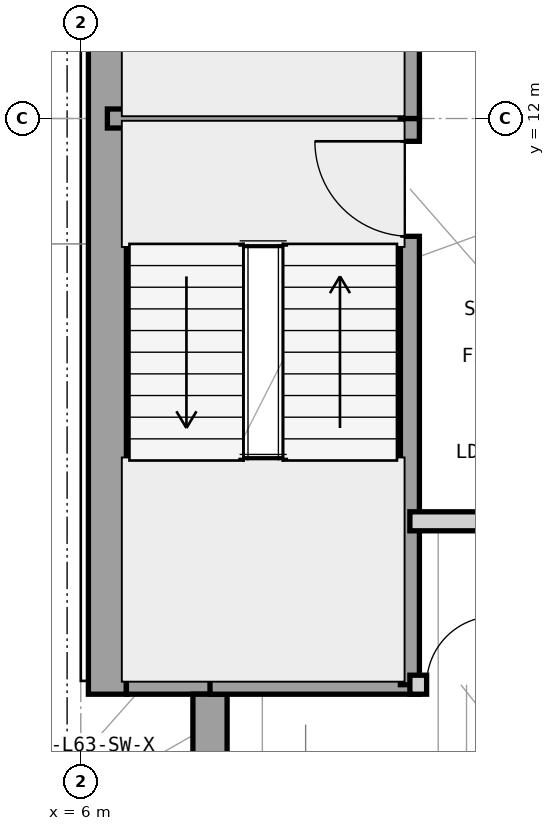
"""IFC4 building model, lengths in metres.
Left out: names, types, materials, properties, quantities, classifications, styles, units other than length and angle.
Written with IfcOpenShell. Run it as: python <this file> out.ifc"""

import sys

from ifc_helpers import new_model, si_unit, direction, frame, frame_2d, origin, place, context, subcontext, project, spatial, rectangle, extrude, element, fill, save


model = new_model("IFC4")
c1 = context("Model", 3, precision=1e-05, world=origin(), true_north=direction((0.0, 1.0)))
c2 = subcontext(c1, "Body", "Model", "MODEL_VIEW")
j1 = project(units=[si_unit("LENGTHUNIT", "METRE"), si_unit("PLANEANGLEUNIT", "RADIAN")], contexts=[c1])
p1 = place(None, origin())
s1 = spatial("IfcSite", under=j1, at=p1, CompositionType="ELEMENT")
p2 = place(p1, origin())
s2 = spatial("IfcBuilding", under=s1, at=p2, CompositionType="ELEMENT")
p3 = place(p2, frame((0.0, 0.0, 258.6)))
s3 = spatial("IfcBuildingStorey", under=s2, at=p3, CompositionType="ELEMENT", Elevation=258.6)
p4 = place(p3, frame((6.35, 4.425, 0.0), z_axis=(0.0, 0.0, 1.0), x_axis=(0.0, 1.0, 0.0)))
e1 = element("IfcWall", 1, at=p4, inside=s3, PredefinedType="SHEAR", context=c2, shape_type="SweptSolid", body=[
    extrude(rectangle(XDim=15.15, YDim=0.5, at=frame_2d((7.575, 0.0))), origin(), (0.0, 0.0, 1.0), 3.9),
])
p5 = place(p3, frame((6.6, 4.65, 0.0), z_axis=(0.0, 0.0, 1.0), x_axis=(1.0, 0.0, 0.0)))
e2 = element("IfcWall", 2, at=p5, inside=s3, PredefinedType="SHEAR", context=c2, shape_type="SweptSolid", body=[
    extrude(rectangle(XDim=1.325, YDim=0.45, at=frame_2d((0.663, 0.0))), origin(), (0.0, 0.0, 1.0), 3.9),
])
p6 = place(p3, frame((7.7, 3.6, 0.0), z_axis=(0.0, 0.0, 1.0), x_axis=(0.0, 1.0, 0.0)))
e3 = element("IfcWall", 3, at=p6, inside=s3, PredefinedType="SHEAR", context=c2, shape_type="SweptSolid", body=[
    extrude(rectangle(XDim=0.825, YDim=0.45, at=frame_2d((0.413, 0.0))), origin(), (0.0, 0.0, 1.0), 3.9),
])
p7 = place(p3, frame((6.35, 12.0, 0.0), z_axis=(0.0, 0.0, 1.0), x_axis=(1.0, 0.0, 0.0)))
e4 = element("IfcWall", 4, at=p7, inside=s3, PredefinedType="SHEAR", context=c2, shape_type="SweptSolid", body=[
    extrude(rectangle(XDim=4.105, YDim=0.25, at=frame_2d((2.052, 0.0))), origin(), (0.0, 0.0, 1.0), 3.9),
])
p8 = place(p3, frame((7.7, 4.55, 0.0), z_axis=(0.0, 0.0, 1.0), x_axis=(1.0, 0.0, 0.0)))
e5 = element("IfcWall", 5, at=p8, inside=s3, PredefinedType="SHEAR", context=c2, shape_type="SweptSolid", body=[
    extrude(rectangle(XDim=2.755, YDim=0.25, at=frame_2d((1.377, 0.0))), origin(), (0.0, 0.0, 1.0), 3.9),
])
p9 = place(p3, frame((10.33, 4.55, 0.0), z_axis=(0.0, 0.0, 1.0), x_axis=(0.0, 1.0, 0.0)))
e6 = element("IfcWall", 6, at=p9, inside=s3, PredefinedType="SHEAR", context=c2, shape_type="SweptSolid", body=[
    extrude(rectangle(XDim=7.45, YDim=0.25, at=frame_2d((3.725, 0.0))), origin(), (0.0, 0.0, 1.0), 3.9),
])
p10 = place(p9, frame((5.9, 0.0, 0.0)))
e7 = element("IfcOpeningElement", 7, at=p10, cuts=e6, PredefinedType="OPENING", context=c2, shape_type="SweptSolid", body=[
    extrude(rectangle(XDim=1.25, YDim=2.2, at=frame_2d((0.625, 1.1))), frame((0.0, 0.135, 0.0), z_axis=(0.0, -1.0, 0.0), x_axis=(1.0, 0.0, 0.0)), (0.0, 0.0, 1.0), 0.27),
])
p11 = place(p3, frame((10.33, 12.0, 0.0), z_axis=(0.0, 0.0, 1.0), x_axis=(0.0, 1.0, 0.0)))
e8 = element("IfcWall", 8, at=p11, inside=s3, PredefinedType="SHEAR", context=c2, shape_type="SweptSolid", body=[
    extrude(rectangle(XDim=7.45, YDim=0.25, at=frame_2d((3.725, 0.0))), origin(), (0.0, 0.0, 1.0), 3.9),
])
p12 = place(p11, frame((5.85, 0.0, 0.0)))
e9 = element("IfcOpeningElement", 9, at=p12, cuts=e8, PredefinedType="OPENING", context=c2, shape_type="SweptSolid", body=[
    extrude(rectangle(XDim=1.25, YDim=2.2, at=frame_2d((0.625, 1.1))), frame((0.0, 0.135, 0.0), z_axis=(0.0, -1.0, 0.0), x_axis=(1.0, 0.0, 0.0)), (0.0, 0.0, 1.0), 0.27),
])
p13 = place(p3, frame((10.33, 4.55, 0.0), z_axis=(0.0, 0.0, 1.0), x_axis=(1.0, 0.0, 0.0)))
e10 = element("IfcWall", 10, at=p13, inside=s3, PredefinedType="PARTITIONING", context=c2, shape_type="SweptSolid", body=[
    extrude(rectangle(XDim=1.49, YDim=0.25, at=frame_2d((0.745, 0.0))), origin(), (0.0, 0.0, 1.0), 3.705),
])
p14 = place(p13, frame((0.22, 0.0, 0.0)))
e11 = element("IfcOpeningElement", 11, at=p14, cuts=e10, PredefinedType="OPENING", context=c2, shape_type="SweptSolid", body=[
    extrude(rectangle(XDim=0.9, YDim=2.1, at=frame_2d((0.45, 1.05))), frame((0.0, 0.135, 0.0), z_axis=(0.0, -1.0, 0.0), x_axis=(1.0, 0.0, 0.0)), (0.0, 0.0, 1.0), 0.27),
])
p15 = place(p3, frame((10.33, 6.7, 0.0), z_axis=(0.0, 0.0, 1.0), x_axis=(1.0, 0.0, 0.0)))
e12 = element("IfcWall", 12, at=p15, inside=s3, PredefinedType="PARTITIONING", context=c2, shape_type="SweptSolid", body=[
    extrude(rectangle(XDim=1.49, YDim=0.25, at=frame_2d((0.745, 0.0))), origin(), (0.0, 0.0, 1.0), 3.088),
])
p16 = place(p10, origin())
e13 = element("IfcDoor", 13, at=p16, inside=s3, OperationType="SINGLE_SWING_RIGHT", PredefinedType="DOOR", context=c2, shape_type="SweptSolid", body=[
    extrude(rectangle(XDim=1.25, YDim=2.2, at=frame_2d((0.625, 1.1))), frame((0.0, 0.025, 0.0), z_axis=(0.0, -1.0, 0.0), x_axis=(1.0, 0.0, 0.0)), (0.0, 0.0, 1.0), 0.05),
])
fill(e7, e13)
p17 = place(p14, origin())
e14 = element("IfcDoor", 14, at=p17, inside=s3, OperationType="SINGLE_SWING_RIGHT", PredefinedType="TRAPDOOR", context=c2, shape_type="SweptSolid", body=[
    extrude(rectangle(XDim=0.9, YDim=2.1, at=frame_2d((0.45, 1.05))), frame((0.0, 0.025, 0.0), z_axis=(0.0, -1.0, 0.0), x_axis=(1.0, 0.0, 0.0)), (0.0, 0.0, 1.0), 0.05),
])
fill(e11, e14)
save(model, sys.argv[1])
